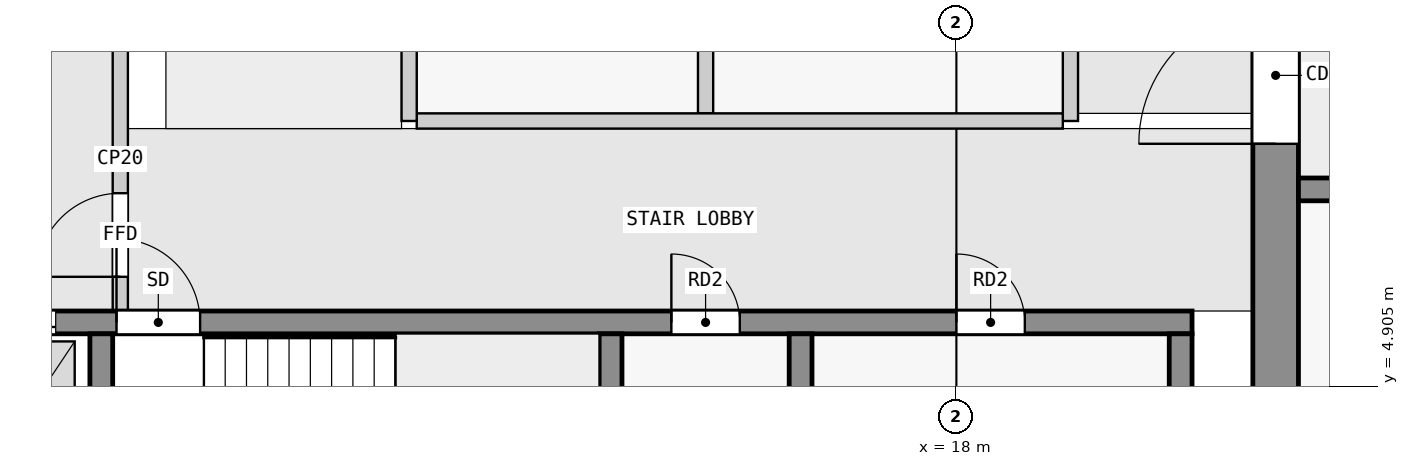
"""IFC4 building model, lengths in metres.
Left out: names, types, materials, properties, quantities, classifications, styles, units other than length and angle.
Written with IfcOpenShell. Run it as: python <this file> out.ifc"""

import sys

from ifc_helpers import new_model, si_unit, direction, frame, frame_2d, origin, place, context, subcontext, project, spatial, rectangle, extrude, element, fill, save


model = new_model("IFC4")
c1 = context("Model", 3, precision=1e-05, world=origin(), true_north=direction((0.0, 1.0)))
c2 = subcontext(c1, "Body", "Model", "MODEL_VIEW")
j1 = project(units=[si_unit("LENGTHUNIT", "METRE"), si_unit("PLANEANGLEUNIT", "RADIAN")], contexts=[c1])
p1 = place(None, origin())
s1 = spatial("IfcSite", under=j1, at=p1, CompositionType="ELEMENT")
p2 = place(p1, origin())
s2 = spatial("IfcBuilding", under=s1, at=p2, CompositionType="ELEMENT")
p3 = place(p2, frame((0.0, 0.0, 160.4)))
s3 = spatial("IfcBuildingStorey", under=s2, at=p3, CompositionType="ELEMENT", Elevation=160.4)
p4 = place(p3, frame((22.2, 2.5, 0.0), z_axis=(0.0, 0.0, 1.0), x_axis=(0.0, 1.0, 0.0)))
e1 = element("IfcWall", 1, at=p4, inside=s3, PredefinedType="SHEAR", context=c2, shape_type="SweptSolid", body=[
    extrude(rectangle(XDim=14.9, YDim=0.6, at=frame_2d((7.45, 0.0))), origin(), (0.0, 0.0, 1.0), 3.25),
])
p5 = place(p4, frame((5.6, 0.0, 0.0)))
e2 = element("IfcOpeningElement", 2, at=p5, cuts=e1, PredefinedType="OPENING", context=c2, shape_type="SweptSolid", body=[
    extrude(rectangle(XDim=1.8, YDim=2.1, at=frame_2d((0.9, 1.05))), frame((0.0, 0.31, 0.0), z_axis=(0.0, -1.0, 0.0), x_axis=(1.0, 0.0, 0.0)), (0.0, 0.0, 1.0), 0.62),
])
for number, where, z_axis, x_axis in (
    (3, (6.75, 2.8, 0.0), (0.0, 0.0, 1.0), (0.0, 1.0, 0.0)),
    (4, (13.45, 2.8, 0.0), (0.0, 0.0, 1.0), (0.0, 1.0, 0.0)),
    (5, (15.95, 2.8, 0.0), (0.0, 0.0, 1.0), (0.0, 1.0, 0.0)),
    (6, (20.95, 2.8, 0.0), (0.0, 0.0, 1.0), (0.0, 1.0, 0.0)),
):
    element("IfcWall", number, at=place(p3, frame(where, z_axis=z_axis, x_axis=x_axis)), inside=s3, PredefinedType="SHEAR", context=c2, shape_type="SweptSolid", body=[
        extrude(rectangle(XDim=2.8, YDim=0.3, at=frame_2d((1.4, 0.0))), origin(), (0.0, 0.0, 1.0), 3.25),
    ])
p6 = place(p3, frame((2.3, 5.75, 0.0), z_axis=(0.0, 0.0, 1.0), x_axis=(1.0, 0.0, 0.0)))
e7 = element("IfcWall", 7, at=p6, inside=s3, PredefinedType="SHEAR", context=c2, shape_type="SweptSolid", body=[
    extrude(rectangle(XDim=18.8, YDim=0.3, at=frame_2d((9.4, 0.0))), origin(), (0.0, 0.0, 1.0), 3.25),
])
p7 = place(p6, frame((4.65, 0.0, 0.0)))
e8 = element("IfcOpeningElement", 8, at=p7, cuts=e7, PredefinedType="OPENING", context=c2, shape_type="SweptSolid", body=[
    extrude(rectangle(XDim=1.1, YDim=2.1, at=frame_2d((0.55, 1.05))), frame((0.0, 0.16, 0.0), z_axis=(0.0, -1.0, 0.0), x_axis=(1.0, 0.0, 0.0)), (0.0, 0.0, 1.0), 0.32),
])
p8 = place(p6, frame((0.45, 0.0, 0.0)))
e9 = element("IfcOpeningElement", 9, at=p8, cuts=e7, PredefinedType="OPENING", context=c2, shape_type="SweptSolid", body=[
    extrude(rectangle(XDim=1.1, YDim=2.1, at=frame_2d((0.55, 1.05))), frame((0.0, 0.16, 0.0), z_axis=(0.0, -1.0, 0.0), x_axis=(1.0, 0.0, 0.0)), (0.0, 0.0, 1.0), 0.32),
])
p9 = place(p6, frame((2.75, 0.0, 0.0)))
e10 = element("IfcOpeningElement", 10, at=p9, cuts=e7, PredefinedType="OPENING", context=c2, shape_type="SweptSolid", body=[
    extrude(rectangle(XDim=1.1, YDim=2.1, at=frame_2d((0.55, 1.05))), frame((0.0, 0.16, 0.0), z_axis=(0.0, -1.0, 0.0), x_axis=(1.0, 0.0, 0.0)), (0.0, 0.0, 1.0), 0.32),
])
p10 = place(p6, frame((11.95, 0.0, 0.0)))
e11 = element("IfcOpeningElement", 11, at=p10, cuts=e7, PredefinedType="OPENING", context=c2, shape_type="SweptSolid", body=[
    extrude(rectangle(XDim=0.9, YDim=2.1, at=frame_2d((0.45, 1.05))), frame((0.0, 0.16, 0.0), z_axis=(0.0, -1.0, 0.0), x_axis=(1.0, 0.0, 0.0)), (0.0, 0.0, 1.0), 0.32),
])
p11 = place(p6, frame((15.7, 0.0, 0.0)))
e12 = element("IfcOpeningElement", 12, at=p11, cuts=e7, PredefinedType="OPENING", context=c2, shape_type="SweptSolid", body=[
    extrude(rectangle(XDim=0.9, YDim=2.1, at=frame_2d((0.45, 1.05))), frame((0.0, 0.16, 0.0), z_axis=(0.0, -1.0, 0.0), x_axis=(1.0, 0.0, 0.0)), (0.0, 0.0, 1.0), 0.32),
])
p12 = place(p3, frame((22.5, 7.5, 0.0), z_axis=(0.0, 0.0, 1.0), x_axis=(1.0, 0.0, 0.0)))
e13 = element("IfcWall", 13, at=p12, inside=s3, PredefinedType="SHEAR", context=c2, shape_type="SweptSolid", body=[
    extrude(rectangle(XDim=22.5, YDim=0.3, at=frame_2d((11.25, 0.0))), origin(), (0.0, 0.0, 1.0), 3.25),
])
p13 = place(p12, frame((1.75, 0.0, 0.0)))
e14 = element("IfcOpeningElement", 14, at=p13, cuts=e13, PredefinedType="OPENING", context=c2, shape_type="SweptSolid", body=[
    extrude(rectangle(XDim=1.0, YDim=2.1, at=frame_2d((0.5, 1.05))), frame((0.0, 0.16, 0.0), z_axis=(0.0, -1.0, 0.0), x_axis=(1.0, 0.0, 0.0)), (0.0, 0.0, 1.0), 0.32),
])
p14 = place(p12, frame((6.25, 0.0, 0.0)))
e15 = element("IfcOpeningElement", 15, at=p14, cuts=e13, PredefinedType="OPENING", context=c2, shape_type="SweptSolid", body=[
    extrude(rectangle(XDim=1.0, YDim=2.1, at=frame_2d((0.5, 1.05))), frame((0.0, 0.16, 0.0), z_axis=(0.0, -1.0, 0.0), x_axis=(1.0, 0.0, 0.0)), (0.0, 0.0, 1.0), 0.32),
])
p15 = place(p12, frame((10.75, 0.0, 0.0)))
e16 = element("IfcOpeningElement", 16, at=p15, cuts=e13, PredefinedType="OPENING", context=c2, shape_type="SweptSolid", body=[
    extrude(rectangle(XDim=1.0, YDim=2.1, at=frame_2d((0.5, 1.05))), frame((0.0, 0.16, 0.0), z_axis=(0.0, -1.0, 0.0), x_axis=(1.0, 0.0, 0.0)), (0.0, 0.0, 1.0), 0.32),
])
p16 = place(p12, frame((15.25, 0.0, 0.0)))
e17 = element("IfcOpeningElement", 17, at=p16, cuts=e13, PredefinedType="OPENING", context=c2, shape_type="SweptSolid", body=[
    extrude(rectangle(XDim=1.0, YDim=2.1, at=frame_2d((0.5, 1.05))), frame((0.0, 0.16, 0.0), z_axis=(0.0, -1.0, 0.0), x_axis=(1.0, 0.0, 0.0)), (0.0, 0.0, 1.0), 0.32),
])
p17 = place(p12, frame((18.75, 0.0, 0.0)))
e18 = element("IfcOpeningElement", 18, at=p17, cuts=e13, PredefinedType="OPENING", context=c2, shape_type="SweptSolid", body=[
    extrude(rectangle(XDim=0.9, YDim=2.1, at=frame_2d((0.45, 1.05))), frame((0.0, 0.16, 0.0), z_axis=(0.0, -1.0, 0.0), x_axis=(1.0, 0.0, 0.0)), (0.0, 0.0, 1.0), 0.32),
])
p18 = place(p12, frame((20.95, 0.0, 0.0)))
e19 = element("IfcOpeningElement", 19, at=p18, cuts=e13, PredefinedType="OPENING", context=c2, shape_type="SweptSolid", body=[
    extrude(rectangle(XDim=1.0, YDim=2.1, at=frame_2d((0.5, 1.05))), frame((0.0, 0.16, 0.0), z_axis=(0.0, -1.0, 0.0), x_axis=(1.0, 0.0, 0.0)), (0.0, 0.0, 1.0), 0.32),
])
p19 = place(p3, frame((7.0, 5.9, 0.0), z_axis=(0.0, 0.0, 1.0), x_axis=(0.0, 1.0, 0.0)))
e20 = element("IfcWall", 20, at=p19, inside=s3, PredefinedType="PARTITIONING", context=c2, shape_type="SweptSolid", body=[
    extrude(rectangle(XDim=4.0, YDim=0.2, at=frame_2d((2.0, 0.0))), origin(), (0.0, 0.0, 1.0), 3.25),
])
p20 = place(p19, frame((0.45, 0.0, 0.0)))
e21 = element("IfcOpeningElement", 21, at=p20, cuts=e20, PredefinedType="OPENING", context=c2, shape_type="SweptSolid", body=[
    extrude(rectangle(XDim=1.1, YDim=2.1, at=frame_2d((0.55, 1.05))), frame((0.0, 0.11, 0.0), z_axis=(0.0, -1.0, 0.0), x_axis=(1.0, 0.0, 0.0)), (0.0, 0.0, 1.0), 0.22),
])
p21 = place(p3, frame((10.8, 8.4, 0.0), z_axis=(0.0, 0.0, 1.0), x_axis=(0.0, 1.0, 0.0)))
e22 = element("IfcWall", 22, at=p21, inside=s3, PredefinedType="PARTITIONING", context=c2, shape_type="SweptSolid", body=[
    extrude(rectangle(XDim=3.8, YDim=0.2, at=frame_2d((1.9, 0.0))), origin(), (0.0, 0.0, 1.0), 3.25),
])
p22 = place(p3, frame((10.9, 8.4, 0.0), z_axis=(0.0, 0.0, 1.0), x_axis=(1.0, 0.0, 0.0)))
e23 = element("IfcWall", 23, at=p22, inside=s3, PredefinedType="PARTITIONING", context=c2, shape_type="SweptSolid", body=[
    extrude(rectangle(XDim=8.5, YDim=0.2, at=frame_2d((4.25, 0.0))), origin(), (0.0, 0.0, 1.0), 3.25),
])
p23 = place(p3, frame((19.5, 8.4, 0.0), z_axis=(0.0, 0.0, 1.0), x_axis=(0.0, 1.0, 0.0)))
e24 = element("IfcWall", 24, at=p23, inside=s3, PredefinedType="PARTITIONING", context=c2, shape_type="SweptSolid", body=[
    extrude(rectangle(XDim=3.8, YDim=0.2, at=frame_2d((1.9, 0.0))), origin(), (0.0, 0.0, 1.0), 3.25),
])
p24 = place(p3, frame((14.7, 8.5, 0.0), z_axis=(0.0, 0.0, 1.0), x_axis=(0.0, 1.0, 0.0)))
e25 = element("IfcWall", 25, at=p24, inside=s3, PredefinedType="PARTITIONING", context=c2, shape_type="SweptSolid", body=[
    extrude(rectangle(XDim=3.6, YDim=0.2, at=frame_2d((1.8, 0.0))), origin(), (0.0, 0.0, 1.0), 3.25),
])
p25 = place(p20, origin())
e26 = element("IfcDoor", 26, at=p25, inside=s3, OperationType="SINGLE_SWING_LEFT", PredefinedType="DOOR", context=c2, shape_type="SweptSolid", body=[
    extrude(rectangle(XDim=1.1, YDim=2.1, at=frame_2d((0.55, 1.05))), frame((0.0, 0.025, 0.0), z_axis=(0.0, -1.0, 0.0), x_axis=(1.0, 0.0, 0.0)), (0.0, 0.0, 1.0), 0.05),
])
fill(e21, e26)
p26 = place(p7, origin())
e27 = element("IfcDoor", 27, at=p26, inside=s3, OperationType="SINGLE_SWING_LEFT", PredefinedType="DOOR", context=c2, shape_type="SweptSolid", body=[
    extrude(rectangle(XDim=1.1, YDim=2.1, at=frame_2d((0.55, 1.05))), frame((0.0, 0.025, 0.0), z_axis=(0.0, -1.0, 0.0), x_axis=(1.0, 0.0, 0.0)), (0.0, 0.0, 1.0), 0.05),
])
fill(e8, e27)
p27 = place(p9, origin())
e28 = element("IfcDoor", 28, at=p27, inside=s3, OperationType="DOUBLE_DOOR_SLIDING", PredefinedType="DOOR", context=c2, shape_type="SweptSolid", body=[
    extrude(rectangle(XDim=1.1, YDim=2.1, at=frame_2d((0.55, 1.05))), frame((0.0, 0.025, 0.0), z_axis=(0.0, -1.0, 0.0), x_axis=(1.0, 0.0, 0.0)), (0.0, 0.0, 1.0), 0.05),
])
fill(e10, e28)
p28 = place(p5, origin())
e29 = element("IfcDoor", 29, at=p28, inside=s3, OperationType="DOUBLE_DOOR_SINGLE_SWING", PredefinedType="DOOR", context=c2, shape_type="SweptSolid", body=[
    extrude(rectangle(XDim=1.8, YDim=2.1, at=frame_2d((0.9, 1.05))), frame((0.0, 0.025, 0.0), z_axis=(0.0, -1.0, 0.0), x_axis=(1.0, 0.0, 0.0)), (0.0, 0.0, 1.0), 0.05),
])
fill(e2, e29)
p29 = place(p10, origin())
e30 = element("IfcDoor", 30, at=p29, inside=s3, OperationType="SINGLE_SWING_LEFT", PredefinedType="DOOR", context=c2, shape_type="SweptSolid", body=[
    extrude(rectangle(XDim=0.9, YDim=2.1, at=frame_2d((0.45, 1.05))), frame((0.0, 0.025, 0.0), z_axis=(0.0, -1.0, 0.0), x_axis=(1.0, 0.0, 0.0)), (0.0, 0.0, 1.0), 0.05),
])
fill(e11, e30)
p30 = place(p11, origin())
e31 = element("IfcDoor", 31, at=p30, inside=s3, OperationType="SINGLE_SWING_LEFT", PredefinedType="DOOR", context=c2, shape_type="SweptSolid", body=[
    extrude(rectangle(XDim=0.9, YDim=2.1, at=frame_2d((0.45, 1.05))), frame((0.0, 0.025, 0.0), z_axis=(0.0, -1.0, 0.0), x_axis=(1.0, 0.0, 0.0)), (0.0, 0.0, 1.0), 0.05),
])
fill(e12, e31)
save(model, sys.argv[1])
